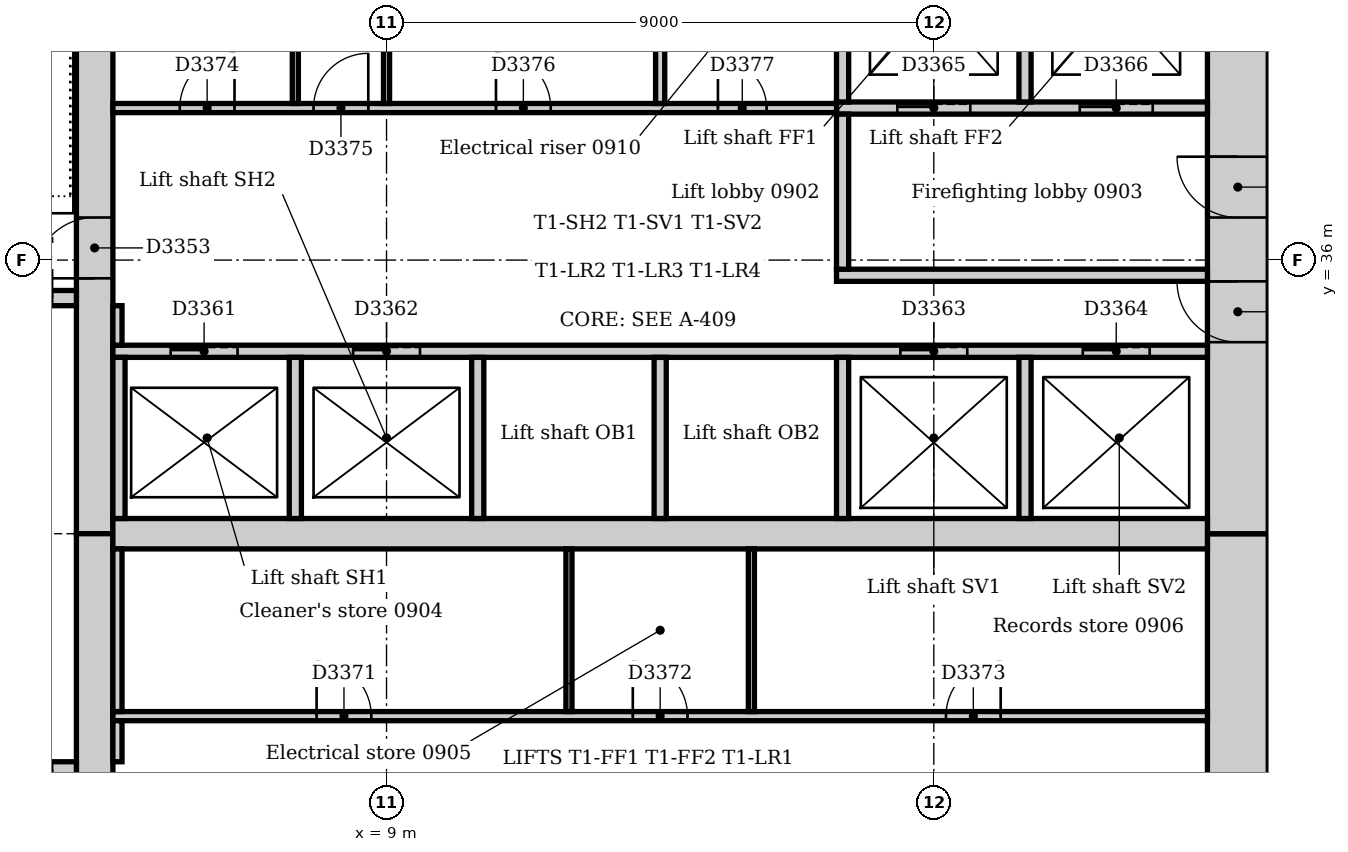
"""IFC4 building model, lengths in metres.
Left out: names, types, materials, properties, quantities, classifications, styles, units other than length and angle.
Written with IfcOpenShell. Run it as: python <this file> out.ifc"""

import sys

from ifc_helpers import new_model, si_unit, direction, frame, frame_2d, origin, place, context, subcontext, project, spatial, rectangle, extrude, element, fill, save


model = new_model("IFC4")
c1 = context("Model", 3, precision=1e-05, world=origin(), true_north=direction((0.0, 1.0)))
c2 = subcontext(c1, "Body", "Model", "MODEL_VIEW")
j1 = project(units=[si_unit("LENGTHUNIT", "METRE"), si_unit("PLANEANGLEUNIT", "RADIAN")], contexts=[c1])
p1 = place(None, origin())
s1 = spatial("IfcSite", under=j1, at=p1, CompositionType="ELEMENT")
p2 = place(p1, origin())
s2 = spatial("IfcBuilding", under=s1, at=p2, CompositionType="ELEMENT")
p3 = place(p2, frame((0.0, 0.0, 42.0)))
s3 = spatial("IfcBuildingStorey", under=s2, at=p3, CompositionType="ELEMENT", Elevation=42.0)
p4 = place(p3, frame((23.0, 21.0, 0.0), z_axis=(0.0, 0.0, 1.0), x_axis=(0.0, 1.0, 0.0)))
e1 = element("IfcWall", 1, at=p4, inside=s3, PredefinedType="SOLIDWALL", context=c2, shape_type="SweptSolid", body=[
    extrude(rectangle(XDim=10.5, YDim=1.0, at=frame_2d((5.25, 0.0))), origin(), (0.0, 0.0, 1.0), 4.0),
])
p5 = place(p4, frame((4.35, 0.0, 0.0)))
e2 = element("IfcOpeningElement", 2, at=p5, cuts=e1, PredefinedType="OPENING", context=c2, shape_type="SweptSolid", body=[
    extrude(rectangle(XDim=1.8, YDim=2.1, at=frame_2d((0.9, 1.05))), frame((0.0, 0.51, 0.0), z_axis=(0.0, -1.0, 0.0), x_axis=(1.0, 0.0, 0.0)), (0.0, 0.0, 1.0), 1.02),
])
p6 = place(p3, frame((23.0, 31.5, 0.0), z_axis=(0.0, 0.0, 1.0), x_axis=(0.0, 1.0, 0.0)))
e3 = element("IfcWall", 3, at=p6, inside=s3, PredefinedType="SOLIDWALL", context=c2, shape_type="SweptSolid", body=[
    extrude(rectangle(XDim=10.5, YDim=1.0, at=frame_2d((5.25, 0.0))), origin(), (0.0, 0.0, 1.0), 4.0),
])
p7 = place(p6, frame((3.15, 0.0, 0.0)))
e4 = element("IfcOpeningElement", 4, at=p7, cuts=e3, PredefinedType="OPENING", context=c2, shape_type="SweptSolid", body=[
    extrude(rectangle(XDim=1.0, YDim=2.1, at=frame_2d((0.5, 1.05))), frame((0.0, 0.51, 0.0), z_axis=(0.0, -1.0, 0.0), x_axis=(1.0, 0.0, 0.0)), (0.0, 0.0, 1.0), 1.02),
])
p8 = place(p6, frame((5.2, 0.0, 0.0)))
e5 = element("IfcOpeningElement", 5, at=p8, cuts=e3, PredefinedType="OPENING", context=c2, shape_type="SweptSolid", body=[
    extrude(rectangle(XDim=1.0, YDim=2.1, at=frame_2d((0.5, 1.05))), frame((0.0, 0.51, 0.0), z_axis=(0.0, -1.0, 0.0), x_axis=(1.0, 0.0, 0.0)), (0.0, 0.0, 1.0), 1.02),
])
p9 = place(p3, frame((4.2, 42.0, 0.0), z_axis=(0.0, 0.0, 1.0), x_axis=(0.0, -1.0, 0.0)))
e6 = element("IfcWall", 6, at=p9, inside=s3, PredefinedType="SOLIDWALL", context=c2, shape_type="SweptSolid", body=[
    extrude(rectangle(XDim=10.5, YDim=0.6, at=frame_2d((5.25, 0.0))), origin(), (0.0, 0.0, 1.0), 4.0),
])
p10 = place(p9, frame((5.3, 0.0, 0.0)))
e7 = element("IfcOpeningElement", 7, at=p10, cuts=e6, PredefinedType="OPENING", context=c2, shape_type="SweptSolid", body=[
    extrude(rectangle(XDim=1.0, YDim=2.1, at=frame_2d((0.5, 1.05))), frame((0.0, 0.31, 0.0), z_axis=(0.0, -1.0, 0.0), x_axis=(1.0, 0.0, 0.0)), (0.0, 0.0, 1.0), 0.62),
])
p11 = place(p3, frame((4.2, 31.5, 0.0), z_axis=(0.0, 0.0, 1.0), x_axis=(0.0, -1.0, 0.0)))
e8 = element("IfcWall", 8, at=p11, inside=s3, PredefinedType="SOLIDWALL", context=c2, shape_type="SweptSolid", body=[
    extrude(rectangle(XDim=10.5, YDim=0.6, at=frame_2d((5.25, 0.0))), origin(), (0.0, 0.0, 1.0), 4.0),
])
p12 = place(p11, frame((4.25, 0.0, 0.0)))
e9 = element("IfcOpeningElement", 9, at=p12, cuts=e8, PredefinedType="OPENING", context=c2, shape_type="SweptSolid", body=[
    extrude(rectangle(XDim=1.0, YDim=2.1, at=frame_2d((0.5, 1.05))), frame((0.0, 0.31, 0.0), z_axis=(0.0, -1.0, 0.0), x_axis=(1.0, 0.0, 0.0)), (0.0, 0.0, 1.0), 0.62),
])
p13 = place(p3, frame((4.5, 31.5, 0.0), z_axis=(0.0, 0.0, 1.0), x_axis=(1.0, 0.0, 0.0)))
e10 = element("IfcWall", 10, at=p13, inside=s3, PredefinedType="SOLIDWALL", context=c2, shape_type="SweptSolid", body=[
    extrude(rectangle(XDim=18.0, YDim=0.5, at=frame_2d((9.0, 0.0))), origin(), (0.0, 0.0, 1.0), 4.0),
])
p14 = place(p3, frame((3.9, 27.625, 0.0), z_axis=(0.0, 0.0, 1.0), x_axis=(-1.0, 0.0, 0.0)))
e11 = element("IfcWall", 11, at=p14, inside=s3, PredefinedType="SOLIDWALL", context=c2, shape_type="SweptSolid", body=[
    extrude(rectangle(XDim=3.54, YDim=0.25, at=frame_2d((1.77, 0.0))), origin(), (0.0, 0.0, 1.0), 4.0),
])
p15 = place(p14, frame((0.4, 0.0, 0.0)))
e12 = element("IfcOpeningElement", 12, at=p15, cuts=e11, PredefinedType="OPENING", context=c2, shape_type="SweptSolid", body=[
    extrude(rectangle(XDim=1.0, YDim=2.1, at=frame_2d((0.5, 1.05))), frame((0.0, 0.135, 0.0), z_axis=(0.0, -1.0, 0.0), x_axis=(1.0, 0.0, 0.0)), (0.0, 0.0, 1.0), 0.27),
])
p16 = place(p3, frame((0.36, 35.375, 0.0), z_axis=(0.0, 0.0, 1.0), x_axis=(1.0, 0.0, 0.0)))
e13 = element("IfcWall", 13, at=p16, inside=s3, PredefinedType="SOLIDWALL", context=c2, shape_type="SweptSolid", body=[
    extrude(rectangle(XDim=3.54, YDim=0.25, at=frame_2d((1.77, 0.0))), origin(), (0.0, 0.0, 1.0), 4.0),
])
p17 = place(p16, frame((2.14, 0.0, 0.0)))
e14 = element("IfcOpeningElement", 14, at=p17, cuts=e13, PredefinedType="OPENING", context=c2, shape_type="SweptSolid", body=[
    extrude(rectangle(XDim=1.0, YDim=2.1, at=frame_2d((0.5, 1.05))), frame((0.0, 0.135, 0.0), z_axis=(0.0, -1.0, 0.0), x_axis=(1.0, 0.0, 0.0)), (0.0, 0.0, 1.0), 0.27),
])
p18 = place(p3, frame((16.4, 35.75, 0.0), z_axis=(0.0, 0.0, 1.0), x_axis=(1.0, 0.0, 0.0)))
e15 = element("IfcWall", 15, at=p18, inside=s3, PredefinedType="PARTITIONING", context=c2, shape_type="SweptSolid", body=[
    extrude(rectangle(XDim=6.1, YDim=0.2, at=frame_2d((3.05, 0.0))), origin(), (0.0, 0.0, 1.0), 3.7),
])
p19 = place(p3, frame((16.4, 38.5, 0.0), z_axis=(0.0, 0.0, 1.0), x_axis=(1.0, 0.0, 0.0)))
e16 = element("IfcWall", 16, at=p19, inside=s3, PredefinedType="PARTITIONING", context=c2, shape_type="SweptSolid", body=[
    extrude(rectangle(XDim=6.1, YDim=0.2, at=frame_2d((3.05, 0.0))), origin(), (0.0, 0.0, 1.0), 3.7),
])
p20 = place(p19, frame((1.0, 0.0, 0.0)))
e17 = element("IfcOpeningElement", 17, at=p20, cuts=e16, PredefinedType="OPENING", context=c2, shape_type="SweptSolid", body=[
    extrude(rectangle(XDim=1.2, YDim=2.1, at=frame_2d((0.6, 1.05))), frame((0.0, 0.11, 0.0), z_axis=(0.0, -1.0, 0.0), x_axis=(1.0, 0.0, 0.0)), (0.0, 0.0, 1.0), 0.22),
])
p21 = place(p19, frame((4.0, 0.0, 0.0)))
e18 = element("IfcOpeningElement", 18, at=p21, cuts=e16, PredefinedType="OPENING", context=c2, shape_type="SweptSolid", body=[
    extrude(rectangle(XDim=1.2, YDim=2.1, at=frame_2d((0.6, 1.05))), frame((0.0, 0.11, 0.0), z_axis=(0.0, -1.0, 0.0), x_axis=(1.0, 0.0, 0.0)), (0.0, 0.0, 1.0), 0.22),
])
p22 = place(p3, frame((16.5, 35.85, 0.0), z_axis=(0.0, 0.0, 1.0), x_axis=(0.0, 1.0, 0.0)))
e19 = element("IfcWall", 19, at=p22, inside=s3, PredefinedType="PARTITIONING", context=c2, shape_type="SweptSolid", body=[
    extrude(rectangle(XDim=2.55, YDim=0.2, at=frame_2d((1.275, 0.0))), origin(), (0.0, 0.0, 1.0), 3.7),
])
p23 = place(p3, frame((4.5, 34.5, 0.0), z_axis=(0.0, 0.0, 1.0), x_axis=(1.0, 0.0, 0.0)))
e20 = element("IfcWall", 20, at=p23, inside=s3, PredefinedType="PARTITIONING", context=c2, shape_type="SweptSolid", body=[
    extrude(rectangle(XDim=18.0, YDim=0.2, at=frame_2d((9.0, 0.0))), origin(), (0.0, 0.0, 1.0), 3.7),
])
p24 = place(p23, frame((0.95, 0.0, 0.0)))
e21 = element("IfcOpeningElement", 21, at=p24, cuts=e20, PredefinedType="OPENING", context=c2, shape_type="SweptSolid", body=[
    extrude(rectangle(XDim=1.1, YDim=2.1, at=frame_2d((0.55, 1.05))), frame((0.0, 0.11, 0.0), z_axis=(0.0, -1.0, 0.0), x_axis=(1.0, 0.0, 0.0)), (0.0, 0.0, 1.0), 0.22),
])
p25 = place(p23, frame((3.95, 0.0, 0.0)))
e22 = element("IfcOpeningElement", 22, at=p25, cuts=e20, PredefinedType="OPENING", context=c2, shape_type="SweptSolid", body=[
    extrude(rectangle(XDim=1.1, YDim=2.1, at=frame_2d((0.55, 1.05))), frame((0.0, 0.11, 0.0), z_axis=(0.0, -1.0, 0.0), x_axis=(1.0, 0.0, 0.0)), (0.0, 0.0, 1.0), 0.22),
])
p26 = place(p23, frame((12.95, 0.0, 0.0)))
e23 = element("IfcOpeningElement", 23, at=p26, cuts=e20, PredefinedType="OPENING", context=c2, shape_type="SweptSolid", body=[
    extrude(rectangle(XDim=1.1, YDim=2.1, at=frame_2d((0.55, 1.05))), frame((0.0, 0.11, 0.0), z_axis=(0.0, -1.0, 0.0), x_axis=(1.0, 0.0, 0.0)), (0.0, 0.0, 1.0), 0.22),
])
p27 = place(p23, frame((15.95, 0.0, 0.0)))
e24 = element("IfcOpeningElement", 24, at=p27, cuts=e20, PredefinedType="OPENING", context=c2, shape_type="SweptSolid", body=[
    extrude(rectangle(XDim=1.1, YDim=2.1, at=frame_2d((0.55, 1.05))), frame((0.0, 0.11, 0.0), z_axis=(0.0, -1.0, 0.0), x_axis=(1.0, 0.0, 0.0)), (0.0, 0.0, 1.0), 0.22),
])
for number, where, z_axis, x_axis in (
    (25, (16.5, 38.6, 0.0), (0.0, 0.0, 1.0), (0.0, 1.0, 0.0)),
    (26, (19.5, 38.6, 0.0), (0.0, 0.0, 1.0), (0.0, 1.0, 0.0)),
):
    element("IfcWall", number, at=place(p3, frame(where, z_axis=z_axis, x_axis=x_axis)), inside=s3, PredefinedType="PARTITIONING", context=c2, shape_type="SweptSolid", body=[
        extrude(rectangle(XDim=3.4, YDim=0.2, at=frame_2d((1.7, 0.0))), origin(), (0.0, 0.0, 1.0), 3.7),
    ])
for number, where, z_axis, x_axis in (
    (27, (4.6, 31.75, 0.0), (0.0, 0.0, 1.0), (0.0, 1.0, 0.0)),
    (28, (7.5, 31.75, 0.0), (0.0, 0.0, 1.0), (0.0, 1.0, 0.0)),
    (29, (10.5, 31.75, 0.0), (0.0, 0.0, 1.0), (0.0, 1.0, 0.0)),
    (30, (13.5, 31.75, 0.0), (0.0, 0.0, 1.0), (0.0, 1.0, 0.0)),
    (31, (16.5, 31.75, 0.0), (0.0, 0.0, 1.0), (0.0, 1.0, 0.0)),
    (32, (19.5, 31.75, 0.0), (0.0, 0.0, 1.0), (0.0, 1.0, 0.0)),
):
    element("IfcWall", number, at=place(p3, frame(where, z_axis=z_axis, x_axis=x_axis)), inside=s3, PredefinedType="PARTITIONING", context=c2, shape_type="SweptSolid", body=[
        extrude(rectangle(XDim=2.65, YDim=0.2, at=frame_2d((1.325, 0.0))), origin(), (0.0, 0.0, 1.0), 3.7),
    ])
p28 = place(p3, frame((4.5, 28.5, 0.0), z_axis=(0.0, 0.0, 1.0), x_axis=(1.0, 0.0, 0.0)))
e33 = element("IfcWall", 33, at=p28, inside=s3, PredefinedType="PARTITIONING", context=c2, shape_type="SweptSolid", body=[
    extrude(rectangle(XDim=18.0, YDim=0.15, at=frame_2d((9.0, 0.0))), origin(), (0.0, 0.0, 1.0), 3.7),
])
p29 = place(p28, frame((3.35, 0.0, 0.0)))
e34 = element("IfcOpeningElement", 34, at=p29, cuts=e33, PredefinedType="OPENING", context=c2, shape_type="SweptSolid", body=[
    extrude(rectangle(XDim=0.9, YDim=2.1, at=frame_2d((0.45, 1.05))), frame((0.0, 0.085, 0.0), z_axis=(0.0, -1.0, 0.0), x_axis=(1.0, 0.0, 0.0)), (0.0, 0.0, 1.0), 0.17),
])
p30 = place(p28, frame((8.55, 0.0, 0.0)))
e35 = element("IfcOpeningElement", 35, at=p30, cuts=e33, PredefinedType="OPENING", context=c2, shape_type="SweptSolid", body=[
    extrude(rectangle(XDim=0.9, YDim=2.1, at=frame_2d((0.45, 1.05))), frame((0.0, 0.085, 0.0), z_axis=(0.0, -1.0, 0.0), x_axis=(1.0, 0.0, 0.0)), (0.0, 0.0, 1.0), 0.17),
])
p31 = place(p28, frame((13.7, 0.0, 0.0)))
e36 = element("IfcOpeningElement", 36, at=p31, cuts=e33, PredefinedType="OPENING", context=c2, shape_type="SweptSolid", body=[
    extrude(rectangle(XDim=0.9, YDim=2.1, at=frame_2d((0.45, 1.05))), frame((0.0, 0.085, 0.0), z_axis=(0.0, -1.0, 0.0), x_axis=(1.0, 0.0, 0.0)), (0.0, 0.0, 1.0), 0.17),
])
p32 = place(p3, frame((4.5, 38.5, 0.0), z_axis=(0.0, 0.0, 1.0), x_axis=(1.0, 0.0, 0.0)))
e37 = element("IfcWall", 37, at=p32, inside=s3, PredefinedType="PARTITIONING", context=c2, shape_type="SweptSolid", body=[
    extrude(rectangle(XDim=11.9, YDim=0.15, at=frame_2d((5.95, 0.0))), origin(), (0.0, 0.0, 1.0), 3.7),
])
p33 = place(p32, frame((1.1, 0.0, 0.0)))
e38 = element("IfcOpeningElement", 38, at=p33, cuts=e37, PredefinedType="OPENING", context=c2, shape_type="SweptSolid", body=[
    extrude(rectangle(XDim=0.9, YDim=2.1, at=frame_2d((0.45, 1.05))), frame((0.0, 0.085, 0.0), z_axis=(0.0, -1.0, 0.0), x_axis=(1.0, 0.0, 0.0)), (0.0, 0.0, 1.0), 0.17),
])
p34 = place(p32, frame((3.3, 0.0, 0.0)))
e39 = element("IfcOpeningElement", 39, at=p34, cuts=e37, PredefinedType="OPENING", context=c2, shape_type="SweptSolid", body=[
    extrude(rectangle(XDim=0.9, YDim=2.1, at=frame_2d((0.45, 1.05))), frame((0.0, 0.085, 0.0), z_axis=(0.0, -1.0, 0.0), x_axis=(1.0, 0.0, 0.0)), (0.0, 0.0, 1.0), 0.17),
])
p35 = place(p32, frame((6.3, 0.0, 0.0)))
e40 = element("IfcOpeningElement", 40, at=p35, cuts=e37, PredefinedType="OPENING", context=c2, shape_type="SweptSolid", body=[
    extrude(rectangle(XDim=0.9, YDim=2.1, at=frame_2d((0.45, 1.05))), frame((0.0, 0.085, 0.0), z_axis=(0.0, -1.0, 0.0), x_axis=(1.0, 0.0, 0.0)), (0.0, 0.0, 1.0), 0.17),
])
p36 = place(p32, frame((9.95, 0.0, 0.0)))
e41 = element("IfcOpeningElement", 41, at=p36, cuts=e37, PredefinedType="OPENING", context=c2, shape_type="SweptSolid", body=[
    extrude(rectangle(XDim=0.8, YDim=2.1, at=frame_2d((0.4, 1.05))), frame((0.0, 0.085, 0.0), z_axis=(0.0, -1.0, 0.0), x_axis=(1.0, 0.0, 0.0)), (0.0, 0.0, 1.0), 0.17),
])
p37 = place(p3, frame((4.575, 27.75, 0.0), z_axis=(0.0, 0.0, 1.0), x_axis=(0.0, 1.0, 0.0)))
e42 = element("IfcWall", 42, at=p37, inside=s3, PredefinedType="PARTITIONING", context=c2, shape_type="SweptSolid", body=[
    extrude(rectangle(XDim=0.675, YDim=0.15, at=frame_2d((0.338, 0.0))), origin(), (0.0, 0.0, 1.0), 3.7),
])
p38 = place(p3, frame((4.575, 28.575, 0.0), z_axis=(0.0, 0.0, 1.0), x_axis=(0.0, 1.0, 0.0)))
e43 = element("IfcWall", 43, at=p38, inside=s3, PredefinedType="PARTITIONING", context=c2, shape_type="SweptSolid", body=[
    extrude(rectangle(XDim=2.675, YDim=0.15, at=frame_2d((1.337, 0.0))), origin(), (0.0, 0.0, 1.0), 3.7),
])
p39 = place(p3, frame((4.575, 34.6, 0.0), z_axis=(0.0, 0.0, 1.0), x_axis=(0.0, 1.0, 0.0)))
e44 = element("IfcWall", 44, at=p39, inside=s3, PredefinedType="PARTITIONING", context=c2, shape_type="SweptSolid", body=[
    extrude(rectangle(XDim=0.65, YDim=0.15, at=frame_2d((0.325, 0.0))), origin(), (0.0, 0.0, 1.0), 3.7),
])
p40 = place(p3, frame((13.5, 38.575, 0.0), z_axis=(0.0, 0.0, 1.0), x_axis=(0.0, 1.0, 0.0)))
e45 = element("IfcWall", 45, at=p40, inside=s3, PredefinedType="PARTITIONING", context=c2, shape_type="SweptSolid", body=[
    extrude(rectangle(XDim=3.425, YDim=0.15, at=frame_2d((1.712, 0.0))), origin(), (0.0, 0.0, 1.0), 3.7),
])
for number, where, z_axis, x_axis in (
    (46, (7.5, 38.575, 0.0), (0.0, 0.0, 1.0), (0.0, 1.0, 0.0)),
    (47, (9.0, 38.575, 0.0), (0.0, 0.0, 1.0), (0.0, 1.0, 0.0)),
):
    element("IfcWall", number, at=place(p3, frame(where, z_axis=z_axis, x_axis=x_axis)), inside=s3, PredefinedType="PARTITIONING", context=c2, shape_type="SweptSolid", body=[
        extrude(rectangle(XDim=3.425, YDim=0.1, at=frame_2d((1.712, 0.0))), origin(), (0.0, 0.0, 1.0), 3.7),
    ])
for number, where, z_axis, x_axis in (
    (48, (12.0, 28.575, 0.0), (0.0, 0.0, 1.0), (0.0, 1.0, 0.0)),
    (49, (15.0, 28.575, 0.0), (0.0, 0.0, 1.0), (0.0, 1.0, 0.0)),
):
    element("IfcWall", number, at=place(p3, frame(where, z_axis=z_axis, x_axis=x_axis)), inside=s3, PredefinedType="PARTITIONING", context=c2, shape_type="SweptSolid", body=[
        extrude(rectangle(XDim=2.675, YDim=0.1, at=frame_2d((1.337, 0.0))), origin(), (0.0, 0.0, 1.0), 3.7),
    ])
p41 = place(p10, frame((1.0, 0.0, 0.0), z_axis=(0.0, 0.0, 1.0), x_axis=(-1.0, 0.0, 0.0)))
e50 = element("IfcDoor", 50, at=p41, inside=s3, OperationType="SINGLE_SWING_LEFT", PredefinedType="DOOR", context=c2, shape_type="SweptSolid", body=[
    extrude(rectangle(XDim=1.0, YDim=2.1, at=frame_2d((0.5, 1.05))), frame((0.0, 0.025, 0.0), z_axis=(0.0, -1.0, 0.0), x_axis=(1.0, 0.0, 0.0)), (0.0, 0.0, 1.0), 0.05),
])
fill(e7, e50)
p42 = place(p24, origin())
e51 = element("IfcDoor", 51, at=p42, inside=s3, OperationType="SLIDING_TO_LEFT", PredefinedType="DOOR", context=c2, shape_type="SweptSolid", body=[
    extrude(rectangle(XDim=1.1, YDim=2.1, at=frame_2d((0.55, 1.05))), frame((0.0, 0.025, 0.0), z_axis=(0.0, -1.0, 0.0), x_axis=(1.0, 0.0, 0.0)), (0.0, 0.0, 1.0), 0.05),
])
fill(e21, e51)
p43 = place(p25, origin())
e52 = element("IfcDoor", 52, at=p43, inside=s3, OperationType="SLIDING_TO_LEFT", PredefinedType="DOOR", context=c2, shape_type="SweptSolid", body=[
    extrude(rectangle(XDim=1.1, YDim=2.1, at=frame_2d((0.55, 1.05))), frame((0.0, 0.025, 0.0), z_axis=(0.0, -1.0, 0.0), x_axis=(1.0, 0.0, 0.0)), (0.0, 0.0, 1.0), 0.05),
])
fill(e22, e52)
p44 = place(p26, origin())
e53 = element("IfcDoor", 53, at=p44, inside=s3, OperationType="SLIDING_TO_LEFT", PredefinedType="DOOR", context=c2, shape_type="SweptSolid", body=[
    extrude(rectangle(XDim=1.1, YDim=2.1, at=frame_2d((0.55, 1.05))), frame((0.0, 0.025, 0.0), z_axis=(0.0, -1.0, 0.0), x_axis=(1.0, 0.0, 0.0)), (0.0, 0.0, 1.0), 0.05),
])
fill(e23, e53)
p45 = place(p27, origin())
e54 = element("IfcDoor", 54, at=p45, inside=s3, OperationType="SLIDING_TO_LEFT", PredefinedType="DOOR", context=c2, shape_type="SweptSolid", body=[
    extrude(rectangle(XDim=1.1, YDim=2.1, at=frame_2d((0.55, 1.05))), frame((0.0, 0.025, 0.0), z_axis=(0.0, -1.0, 0.0), x_axis=(1.0, 0.0, 0.0)), (0.0, 0.0, 1.0), 0.05),
])
fill(e24, e54)
p46 = place(p20, origin())
e55 = element("IfcDoor", 55, at=p46, inside=s3, OperationType="SLIDING_TO_LEFT", PredefinedType="DOOR", context=c2, shape_type="SweptSolid", body=[
    extrude(rectangle(XDim=1.2, YDim=2.1, at=frame_2d((0.6, 1.05))), frame((0.0, 0.025, 0.0), z_axis=(0.0, -1.0, 0.0), x_axis=(1.0, 0.0, 0.0)), (0.0, 0.0, 1.0), 0.05),
])
fill(e17, e55)
p47 = place(p21, origin())
e56 = element("IfcDoor", 56, at=p47, inside=s3, OperationType="SLIDING_TO_LEFT", PredefinedType="DOOR", context=c2, shape_type="SweptSolid", body=[
    extrude(rectangle(XDim=1.2, YDim=2.1, at=frame_2d((0.6, 1.05))), frame((0.0, 0.025, 0.0), z_axis=(0.0, -1.0, 0.0), x_axis=(1.0, 0.0, 0.0)), (0.0, 0.0, 1.0), 0.05),
])
fill(e18, e56)
p48 = place(p7, origin())
e57 = element("IfcDoor", 57, at=p48, inside=s3, OperationType="SINGLE_SWING_RIGHT", PredefinedType="DOOR", context=c2, shape_type="SweptSolid", body=[
    extrude(rectangle(XDim=1.0, YDim=2.1, at=frame_2d((0.5, 1.05))), frame((0.0, 0.025, 0.0), z_axis=(0.0, -1.0, 0.0), x_axis=(1.0, 0.0, 0.0)), (0.0, 0.0, 1.0), 0.05),
])
fill(e4, e57)
p49 = place(p8, origin())
e58 = element("IfcDoor", 58, at=p49, inside=s3, OperationType="SINGLE_SWING_RIGHT", PredefinedType="DOOR", context=c2, shape_type="SweptSolid", body=[
    extrude(rectangle(XDim=1.0, YDim=2.1, at=frame_2d((0.5, 1.05))), frame((0.0, 0.025, 0.0), z_axis=(0.0, -1.0, 0.0), x_axis=(1.0, 0.0, 0.0)), (0.0, 0.0, 1.0), 0.05),
])
fill(e5, e58)
p50 = place(p29, origin())
e59 = element("IfcDoor", 59, at=p50, inside=s3, OperationType="SINGLE_SWING_LEFT", PredefinedType="DOOR", context=c2, shape_type="SweptSolid", body=[
    extrude(rectangle(XDim=0.9, YDim=2.1, at=frame_2d((0.45, 1.05))), frame((0.0, 0.025, 0.0), z_axis=(0.0, -1.0, 0.0), x_axis=(1.0, 0.0, 0.0)), (0.0, 0.0, 1.0), 0.05),
])
fill(e34, e59)
p51 = place(p30, origin())
e60 = element("IfcDoor", 60, at=p51, inside=s3, OperationType="SINGLE_SWING_LEFT", PredefinedType="DOOR", context=c2, shape_type="SweptSolid", body=[
    extrude(rectangle(XDim=0.9, YDim=2.1, at=frame_2d((0.45, 1.05))), frame((0.0, 0.025, 0.0), z_axis=(0.0, -1.0, 0.0), x_axis=(1.0, 0.0, 0.0)), (0.0, 0.0, 1.0), 0.05),
])
fill(e35, e60)
p52 = place(p31, origin())
e61 = element("IfcDoor", 61, at=p52, inside=s3, OperationType="SINGLE_SWING_RIGHT", PredefinedType="DOOR", context=c2, shape_type="SweptSolid", body=[
    extrude(rectangle(XDim=0.9, YDim=2.1, at=frame_2d((0.45, 1.05))), frame((0.0, 0.025, 0.0), z_axis=(0.0, -1.0, 0.0), x_axis=(1.0, 0.0, 0.0)), (0.0, 0.0, 1.0), 0.05),
])
fill(e36, e61)
p53 = place(p33, origin())
e62 = element("IfcDoor", 62, at=p53, inside=s3, OperationType="SINGLE_SWING_RIGHT", PredefinedType="DOOR", context=c2, shape_type="SweptSolid", body=[
    extrude(rectangle(XDim=0.9, YDim=2.1, at=frame_2d((0.45, 1.05))), frame((0.0, 0.025, 0.0), z_axis=(0.0, -1.0, 0.0), x_axis=(1.0, 0.0, 0.0)), (0.0, 0.0, 1.0), 0.05),
])
fill(e38, e62)
p54 = place(p34, origin())
e63 = element("IfcDoor", 63, at=p54, inside=s3, OperationType="SINGLE_SWING_RIGHT", PredefinedType="DOOR", context=c2, shape_type="SweptSolid", body=[
    extrude(rectangle(XDim=0.9, YDim=2.1, at=frame_2d((0.45, 1.05))), frame((0.0, 0.025, 0.0), z_axis=(0.0, -1.0, 0.0), x_axis=(1.0, 0.0, 0.0)), (0.0, 0.0, 1.0), 0.05),
])
fill(e39, e63)
p55 = place(p35, origin())
e64 = element("IfcDoor", 64, at=p55, inside=s3, OperationType="SINGLE_SWING_LEFT", PredefinedType="DOOR", context=c2, shape_type="SweptSolid", body=[
    extrude(rectangle(XDim=0.9, YDim=2.1, at=frame_2d((0.45, 1.05))), frame((0.0, 0.025, 0.0), z_axis=(0.0, -1.0, 0.0), x_axis=(1.0, 0.0, 0.0)), (0.0, 0.0, 1.0), 0.05),
])
fill(e40, e64)
p56 = place(p36, origin())
e65 = element("IfcDoor", 65, at=p56, inside=s3, OperationType="SINGLE_SWING_LEFT", PredefinedType="DOOR", context=c2, shape_type="SweptSolid", body=[
    extrude(rectangle(XDim=0.8, YDim=2.1, at=frame_2d((0.4, 1.05))), frame((0.0, 0.025, 0.0), z_axis=(0.0, -1.0, 0.0), x_axis=(1.0, 0.0, 0.0)), (0.0, 0.0, 1.0), 0.05),
])
fill(e41, e65)
save(model, sys.argv[1])
